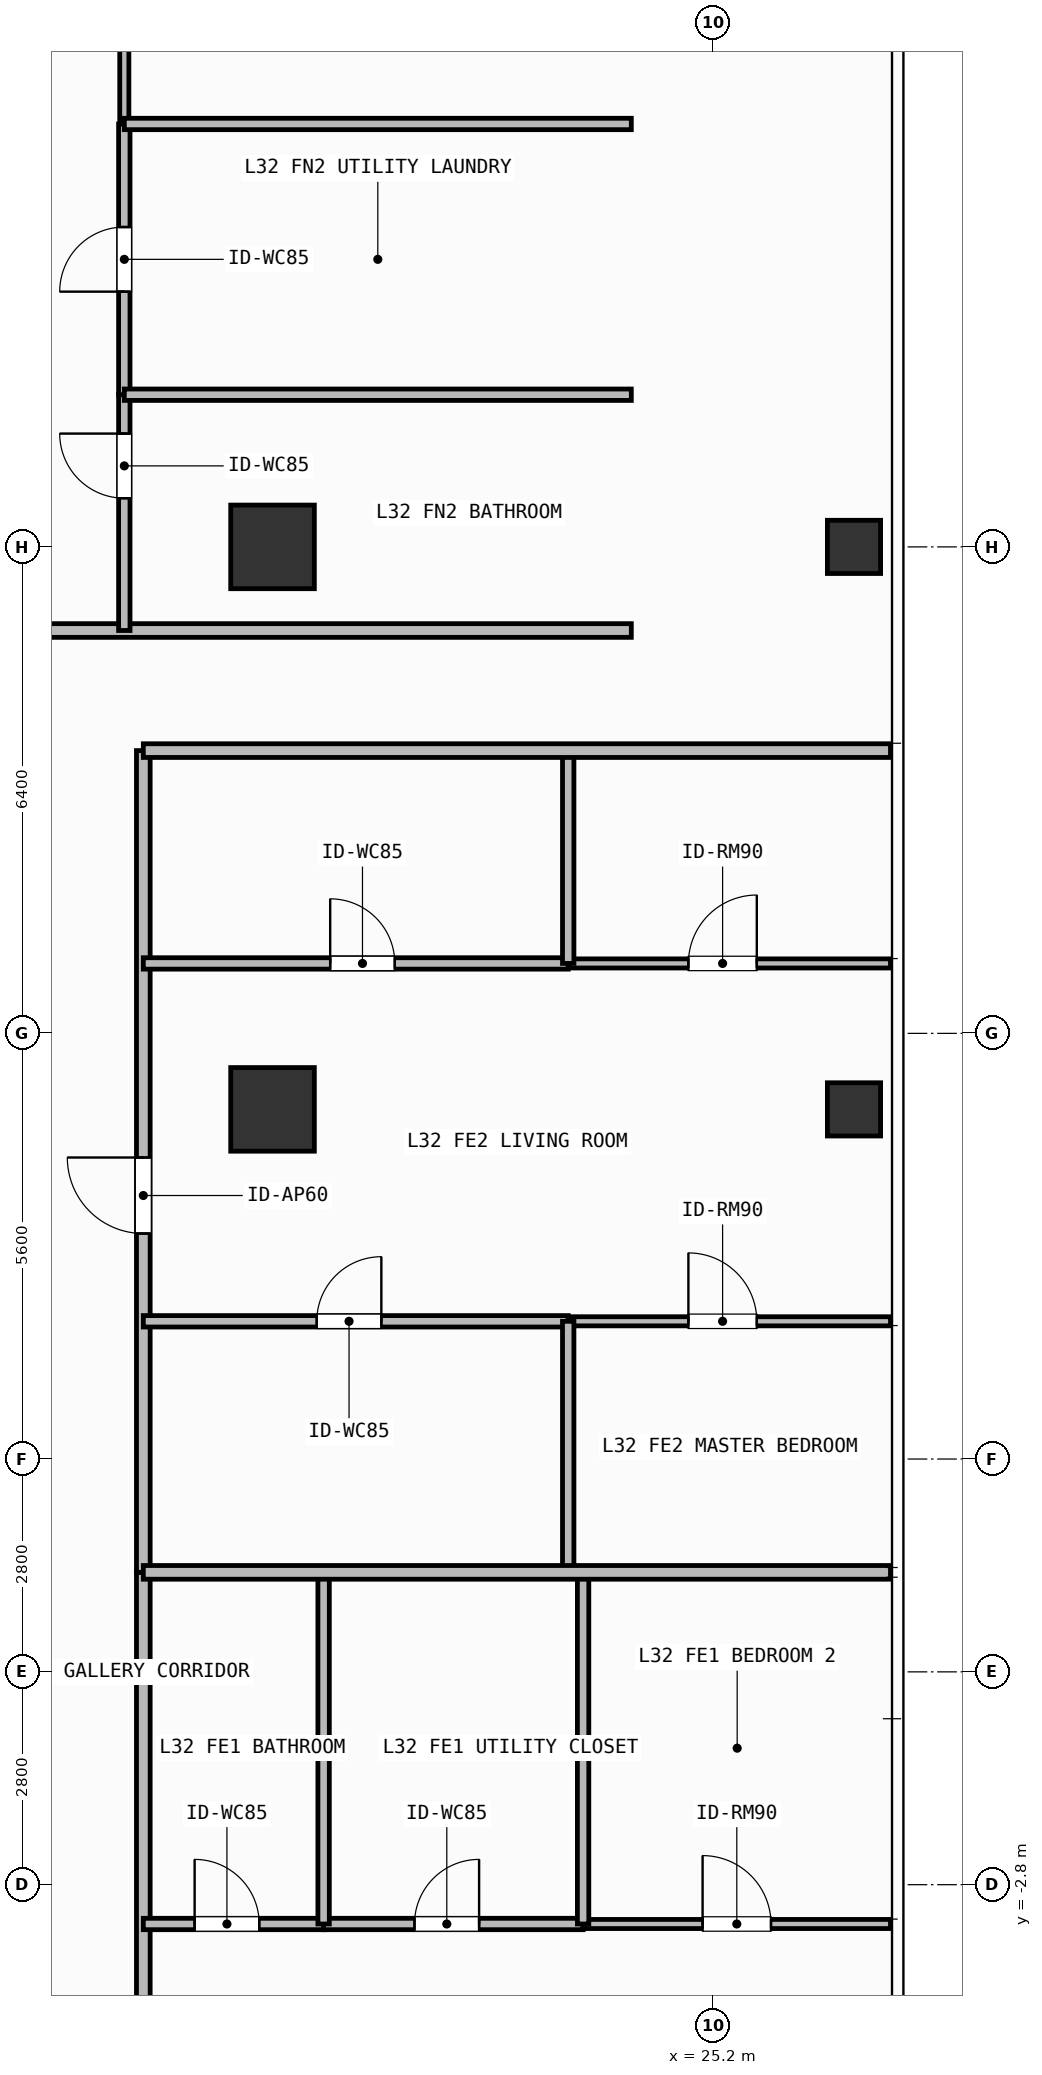
"""IFC4 building model, lengths in metres.
Left out: names, types, materials, properties, quantities, classifications, styles, units other than length and angle.
Written with IfcOpenShell. Run it as: python <this file> out.ifc"""

import sys

from ifc_helpers import new_model, si_unit, direction, frame, frame_2d, origin, origin_2d, place, context, subcontext, project, spatial, rectangle, hollow_rectangle, extrude, element, fill, save


model = new_model("IFC4")
c1 = context("Model", 3, precision=1e-05, world=origin(), true_north=direction((0.0, 1.0)))
c2 = subcontext(c1, "Body", "Model", "MODEL_VIEW")
j1 = project(units=[si_unit("LENGTHUNIT", "METRE"), si_unit("PLANEANGLEUNIT", "RADIAN")], contexts=[c1])
p1 = place(None, origin())
s1 = spatial("IfcSite", under=j1, at=p1, CompositionType="ELEMENT")
p2 = place(p1, origin())
s2 = spatial("IfcBuilding", under=s1, at=p2, CompositionType="ELEMENT")
p3 = place(p2, frame((0.0, 0.0, 129.0)))
s3 = spatial("IfcBuildingStorey", under=s2, at=p3, CompositionType="ELEMENT", Elevation=129.0)
for number, where, z_axis, x_axis in (
    (1, (19.4, 7.4, 0.0), (0.0, 0.0, 1.0), (1.0, 0.0, 0.0)),
    (2, (19.4, 14.8, 0.0), (0.0, 0.0, 1.0), (1.0, 0.0, 0.0)),
):
    element("IfcColumn", number, at=place(p3, frame(where, z_axis=z_axis, x_axis=x_axis)), inside=s3, PredefinedType="COLUMN", context=c2, shape_type="SweptSolid", body=[
        extrude(rectangle(XDim=1.1, YDim=1.1, at=origin_2d()), origin(), (0.0, 0.0, 1.0), 3.9),
    ])
for number, where, z_axis, x_axis in (
    (3, (27.05, 7.4, 0.0), (0.0, 0.0, 1.0), (1.0, 0.0, 0.0)),
    (4, (27.05, 14.8, 0.0), (0.0, 0.0, 1.0), (1.0, 0.0, 0.0)),
):
    element("IfcColumn", number, at=place(p3, frame(where, z_axis=z_axis, x_axis=x_axis)), inside=s3, PredefinedType="COLUMN", context=c2, shape_type="SweptSolid", body=[
        extrude(hollow_rectangle(XDim=0.7, YDim=0.7, WallThickness=0.032, at=origin_2d()), origin(), (0.0, 0.0, 1.0), 3.9),
    ])
p4 = place(p3, frame((1.474, 13.7, 0.0), z_axis=(0.0, 0.0, 1.0), x_axis=(1.0, 0.0, 0.0)))
e5 = element("IfcWall", 5, at=p4, inside=s3, PredefinedType="PARTITIONING", context=c2, shape_type="SweptSolid", body=[
    extrude(rectangle(XDim=22.646, YDim=0.18, at=frame_2d((11.323, 0.0))), origin(), (0.0, 0.0, 1.0), 3.68),
])
p5 = place(p4, frame((10.196, 0.0, 0.0)))
e6 = element("IfcOpeningElement", 6, at=p5, cuts=e5, PredefinedType="OPENING", context=c2, shape_type="SweptSolid", body=[
    extrude(rectangle(XDim=1.0, YDim=2.2, at=frame_2d((0.5, 1.1))), frame((0.0, 0.1, 0.0), z_axis=(0.0, -1.0, 0.0), x_axis=(1.0, 0.0, 0.0)), (0.0, 0.0, 1.0), 0.2),
])
p6 = place(p3, frame((17.45, 13.7, 0.0), z_axis=(0.0, 0.0, 1.0), x_axis=(0.0, 1.0, 0.0)))
e7 = element("IfcWall", 7, at=p6, inside=s3, PredefinedType="PARTITIONING", context=c2, shape_type="SweptSolid", body=[
    extrude(rectangle(XDim=3.102, YDim=0.15, at=frame_2d((1.551, 0.0))), origin(), (0.0, 0.0, 1.0), 3.68),
])
p7 = place(p6, frame((1.741, 0.0, 0.0)))
e8 = element("IfcOpeningElement", 8, at=p7, cuts=e7, PredefinedType="OPENING", context=c2, shape_type="SweptSolid", body=[
    extrude(rectangle(XDim=0.85, YDim=2.1, at=frame_2d((0.425, 1.05))), frame((0.0, 0.085, 0.0), z_axis=(0.0, -1.0, 0.0), x_axis=(1.0, 0.0, 0.0)), (0.0, 0.0, 1.0), 0.17),
])
p8 = place(p3, frame((17.45, 16.802, 0.0), z_axis=(0.0, 0.0, 1.0), x_axis=(0.0, 1.0, 0.0)))
e9 = element("IfcWall", 9, at=p8, inside=s3, PredefinedType="PARTITIONING", context=c2, shape_type="SweptSolid", body=[
    extrude(rectangle(XDim=3.562, YDim=0.15, at=frame_2d((1.781, 0.0))), origin(), (0.0, 0.0, 1.0), 3.68),
])
p9 = place(p8, frame((1.356, 0.0, 0.0)))
e10 = element("IfcOpeningElement", 10, at=p9, cuts=e9, PredefinedType="OPENING", context=c2, shape_type="SweptSolid", body=[
    extrude(rectangle(XDim=0.85, YDim=2.1, at=frame_2d((0.425, 1.05))), frame((0.0, 0.085, 0.0), z_axis=(0.0, -1.0, 0.0), x_axis=(1.0, 0.0, 0.0)), (0.0, 0.0, 1.0), 0.17),
])
p10 = place(p3, frame((17.45, 20.364, 0.0), z_axis=(0.0, 0.0, 1.0), x_axis=(0.0, 1.0, 0.0)))
e11 = element("IfcWall", 11, at=p10, inside=s3, PredefinedType="PARTITIONING", context=c2, shape_type="SweptSolid", body=[
    extrude(rectangle(XDim=4.826, YDim=0.12, at=frame_2d((2.413, 0.0))), origin(), (0.0, 0.0, 1.0), 3.68),
])
p11 = place(p10, frame((1.901, 0.0, 0.0)))
e12 = element("IfcOpeningElement", 12, at=p11, cuts=e11, PredefinedType="OPENING", context=c2, shape_type="SweptSolid", body=[
    extrude(rectangle(XDim=0.85, YDim=2.1, at=frame_2d((0.425, 1.05))), frame((0.0, 0.07, 0.0), z_axis=(0.0, -1.0, 0.0), x_axis=(1.0, 0.0, 0.0)), (0.0, 0.0, 1.0), 0.14),
])
p12 = place(p3, frame((17.7, -12.12, 0.0), z_axis=(0.0, 0.0, 1.0), x_axis=(0.0, 1.0, 0.0)))
e13 = element("IfcWall", 13, at=p12, inside=s3, PredefinedType="PARTITIONING", context=c2, shape_type="SweptSolid", body=[
    extrude(rectangle(XDim=13.429, YDim=0.18, at=frame_2d((6.715, 0.0))), origin(), (0.0, 0.0, 1.0), 3.68),
])
p13 = place(p12, frame((5.324, 0.0, 0.0)))
e14 = element("IfcOpeningElement", 14, at=p13, cuts=e13, PredefinedType="OPENING", context=c2, shape_type="SweptSolid", body=[
    extrude(rectangle(XDim=1.0, YDim=2.2, at=frame_2d((0.5, 1.1))), frame((0.0, 0.1, 0.0), z_axis=(0.0, -1.0, 0.0), x_axis=(1.0, 0.0, 0.0)), (0.0, 0.0, 1.0), 0.2),
])
p14 = place(p3, frame((17.7, -3.317, 0.0), z_axis=(0.0, 0.0, 1.0), x_axis=(1.0, 0.0, 0.0)))
e15 = element("IfcWall", 15, at=p14, inside=s3, PredefinedType="PARTITIONING", context=c2, shape_type="SweptSolid", body=[
    extrude(rectangle(XDim=2.372, YDim=0.15, at=frame_2d((1.186, 0.0))), origin(), (0.0, 0.0, 1.0), 3.68),
])
p15 = place(p14, frame((0.675, 0.0, 0.0)))
e16 = element("IfcOpeningElement", 16, at=p15, cuts=e15, PredefinedType="OPENING", context=c2, shape_type="SweptSolid", body=[
    extrude(rectangle(XDim=0.85, YDim=2.1, at=frame_2d((0.425, 1.05))), frame((0.0, 0.085, 0.0), z_axis=(0.0, -1.0, 0.0), x_axis=(1.0, 0.0, 0.0)), (0.0, 0.0, 1.0), 0.17),
])
p16 = place(p3, frame((20.072, -3.317, 0.0), z_axis=(0.0, 0.0, 1.0), x_axis=(1.0, 0.0, 0.0)))
e17 = element("IfcWall", 17, at=p16, inside=s3, PredefinedType="PARTITIONING", context=c2, shape_type="SweptSolid", body=[
    extrude(rectangle(XDim=3.414, YDim=0.15, at=frame_2d((1.707, 0.0))), origin(), (0.0, 0.0, 1.0), 3.68),
])
p17 = place(p16, frame((1.196, 0.0, 0.0)))
e18 = element("IfcOpeningElement", 18, at=p17, cuts=e17, PredefinedType="OPENING", context=c2, shape_type="SweptSolid", body=[
    extrude(rectangle(XDim=0.85, YDim=2.1, at=frame_2d((0.425, 1.05))), frame((0.0, 0.085, 0.0), z_axis=(0.0, -1.0, 0.0), x_axis=(1.0, 0.0, 0.0)), (0.0, 0.0, 1.0), 0.17),
])
p18 = place(p3, frame((23.486, -3.317, 0.0), z_axis=(0.0, 0.0, 1.0), x_axis=(1.0, 0.0, 0.0)))
e19 = element("IfcWall", 19, at=p18, inside=s3, PredefinedType="PARTITIONING", context=c2, shape_type="SweptSolid", body=[
    extrude(rectangle(XDim=4.044, YDim=0.12, at=frame_2d((2.022, 0.0))), origin(), (0.0, 0.0, 1.0), 3.68),
])
p19 = place(p18, frame((1.572, 0.0, 0.0)))
e20 = element("IfcOpeningElement", 20, at=p19, cuts=e19, PredefinedType="OPENING", context=c2, shape_type="SweptSolid", body=[
    extrude(rectangle(XDim=0.9, YDim=2.1, at=frame_2d((0.45, 1.05))), frame((0.0, 0.07, 0.0), z_axis=(0.0, -1.0, 0.0), x_axis=(1.0, 0.0, 0.0)), (0.0, 0.0, 1.0), 0.14),
])
p20 = place(p3, frame((17.7, 1.309, 0.0), z_axis=(0.0, 0.0, 1.0), x_axis=(0.0, 1.0, 0.0)))
e21 = element("IfcWall", 21, at=p20, inside=s3, PredefinedType="PARTITIONING", context=c2, shape_type="SweptSolid", body=[
    extrude(rectangle(XDim=10.811, YDim=0.18, at=frame_2d((5.406, 0.0))), origin(), (0.0, 0.0, 1.0), 3.68),
])
p21 = place(p20, frame((4.458, 0.0, 0.0)))
e22 = element("IfcOpeningElement", 22, at=p21, cuts=e21, PredefinedType="OPENING", context=c2, shape_type="SweptSolid", body=[
    extrude(rectangle(XDim=1.0, YDim=2.2, at=frame_2d((0.5, 1.1))), frame((0.0, 0.1, 0.0), z_axis=(0.0, -1.0, 0.0), x_axis=(1.0, 0.0, 0.0)), (0.0, 0.0, 1.0), 0.2),
])
p22 = place(p3, frame((17.7, 9.32, 0.0), z_axis=(0.0, 0.0, 1.0), x_axis=(1.0, 0.0, 0.0)))
e23 = element("IfcWall", 23, at=p22, inside=s3, PredefinedType="PARTITIONING", context=c2, shape_type="SweptSolid", body=[
    extrude(rectangle(XDim=5.59, YDim=0.15, at=frame_2d((2.795, 0.0))), origin(), (0.0, 0.0, 1.0), 3.68),
])
p23 = place(p22, frame((2.458, 0.0, 0.0)))
e24 = element("IfcOpeningElement", 24, at=p23, cuts=e23, PredefinedType="OPENING", context=c2, shape_type="SweptSolid", body=[
    extrude(rectangle(XDim=0.85, YDim=2.1, at=frame_2d((0.425, 1.05))), frame((0.0, 0.085, 0.0), z_axis=(0.0, -1.0, 0.0), x_axis=(1.0, 0.0, 0.0)), (0.0, 0.0, 1.0), 0.17),
])
p24 = place(p3, frame((17.7, 4.612, 0.0), z_axis=(0.0, 0.0, 1.0), x_axis=(1.0, 0.0, 0.0)))
e25 = element("IfcWall", 25, at=p24, inside=s3, PredefinedType="PARTITIONING", context=c2, shape_type="SweptSolid", body=[
    extrude(rectangle(XDim=5.59, YDim=0.15, at=frame_2d((2.795, 0.0))), origin(), (0.0, 0.0, 1.0), 3.68),
])
p25 = place(p24, frame((2.281, 0.0, 0.0)))
e26 = element("IfcOpeningElement", 26, at=p25, cuts=e25, PredefinedType="OPENING", context=c2, shape_type="SweptSolid", body=[
    extrude(rectangle(XDim=0.85, YDim=2.1, at=frame_2d((0.425, 1.05))), frame((0.0, 0.085, 0.0), z_axis=(0.0, -1.0, 0.0), x_axis=(1.0, 0.0, 0.0)), (0.0, 0.0, 1.0), 0.17),
])
p26 = place(p3, frame((23.29, 4.612, 0.0), z_axis=(0.0, 0.0, 1.0), x_axis=(1.0, 0.0, 0.0)))
e27 = element("IfcWall", 27, at=p26, inside=s3, PredefinedType="PARTITIONING", context=c2, shape_type="SweptSolid", body=[
    extrude(rectangle(XDim=4.24, YDim=0.12, at=frame_2d((2.12, 0.0))), origin(), (0.0, 0.0, 1.0), 3.68),
])
p27 = place(p26, frame((1.581, 0.0, 0.0)))
e28 = element("IfcOpeningElement", 28, at=p27, cuts=e27, PredefinedType="OPENING", context=c2, shape_type="SweptSolid", body=[
    extrude(rectangle(XDim=0.9, YDim=2.1, at=frame_2d((0.45, 1.05))), frame((0.0, 0.07, 0.0), z_axis=(0.0, -1.0, 0.0), x_axis=(1.0, 0.0, 0.0)), (0.0, 0.0, 1.0), 0.14),
])
p28 = place(p3, frame((23.29, 9.32, 0.0), z_axis=(0.0, 0.0, 1.0), x_axis=(1.0, 0.0, 0.0)))
e29 = element("IfcWall", 29, at=p28, inside=s3, PredefinedType="PARTITIONING", context=c2, shape_type="SweptSolid", body=[
    extrude(rectangle(XDim=4.24, YDim=0.12, at=frame_2d((2.12, 0.0))), origin(), (0.0, 0.0, 1.0), 3.68),
])
p29 = place(p28, frame((1.581, 0.0, 0.0)))
e30 = element("IfcOpeningElement", 30, at=p29, cuts=e29, PredefinedType="OPENING", context=c2, shape_type="SweptSolid", body=[
    extrude(rectangle(XDim=0.9, YDim=2.1, at=frame_2d((0.45, 1.05))), frame((0.0, 0.07, 0.0), z_axis=(0.0, -1.0, 0.0), x_axis=(1.0, 0.0, 0.0)), (0.0, 0.0, 1.0), 0.14),
])
for number, where, z_axis, x_axis in (
    (31, (17.45, 16.802, 0.0), (0.0, 0.0, 1.0), (1.0, 0.0, 0.0)),
    (32, (17.45, 20.364, 0.0), (0.0, 0.0, 1.0), (1.0, 0.0, 0.0)),
):
    element("IfcWall", number, at=place(p3, frame(where, z_axis=z_axis, x_axis=x_axis)), inside=s3, PredefinedType="PARTITIONING", context=c2, shape_type="SweptSolid", body=[
        extrude(rectangle(XDim=6.67, YDim=0.15, at=frame_2d((3.335, 0.0))), origin(), (0.0, 0.0, 1.0), 3.68),
    ])
for number, where, z_axis, x_axis in (
    (33, (20.072, -3.317, 0.0), (0.0, 0.0, 1.0), (0.0, 1.0, 0.0)),
    (34, (23.486, -3.317, 0.0), (0.0, 0.0, 1.0), (0.0, 1.0, 0.0)),
):
    element("IfcWall", number, at=place(p3, frame(where, z_axis=z_axis, x_axis=x_axis)), inside=s3, PredefinedType="PARTITIONING", context=c2, shape_type="SweptSolid", body=[
        extrude(rectangle(XDim=4.626, YDim=0.15, at=frame_2d((2.313, 0.0))), origin(), (0.0, 0.0, 1.0), 3.68),
    ])
p30 = place(p3, frame((23.29, 1.309, 0.0), z_axis=(0.0, 0.0, 1.0), x_axis=(0.0, 1.0, 0.0)))
e35 = element("IfcWall", 35, at=p30, inside=s3, PredefinedType="PARTITIONING", context=c2, shape_type="SweptSolid", body=[
    extrude(rectangle(XDim=3.303, YDim=0.15, at=frame_2d((1.651, 0.0))), origin(), (0.0, 0.0, 1.0), 3.68),
])
p31 = place(p3, frame((23.29, 9.32, 0.0), z_axis=(0.0, 0.0, 1.0), x_axis=(0.0, 1.0, 0.0)))
e36 = element("IfcWall", 36, at=p31, inside=s3, PredefinedType="PARTITIONING", context=c2, shape_type="SweptSolid", body=[
    extrude(rectangle(XDim=2.8, YDim=0.15, at=frame_2d((1.4, 0.0))), origin(), (0.0, 0.0, 1.0), 3.68),
])
for number, where, z_axis, x_axis in (
    (37, (17.7, 1.309, 0.0), (0.0, 0.0, 1.0), (1.0, 0.0, 0.0)),
    (38, (17.7, 12.12, 0.0), (0.0, 0.0, 1.0), (1.0, 0.0, 0.0)),
):
    element("IfcWall", number, at=place(p3, frame(where, z_axis=z_axis, x_axis=x_axis)), inside=s3, PredefinedType="PARTITIONING", context=c2, shape_type="SweptSolid", body=[
        extrude(rectangle(XDim=9.83, YDim=0.18, at=frame_2d((4.915, 0.0))), origin(), (0.0, 0.0, 1.0), 3.68),
    ])
p32 = place(p7, origin())
e39 = element("IfcDoor", 39, at=p32, inside=s3, OperationType="SINGLE_SWING_RIGHT", PredefinedType="DOOR", context=c2, shape_type="SweptSolid", body=[
    extrude(rectangle(XDim=0.85, YDim=2.1, at=frame_2d((0.425, 1.05))), frame((0.0, 0.025, 0.0), z_axis=(0.0, -1.0, 0.0), x_axis=(1.0, 0.0, 0.0)), (0.0, 0.0, 1.0), 0.05),
])
fill(e8, e39)
p33 = place(p9, origin())
e40 = element("IfcDoor", 40, at=p33, inside=s3, OperationType="SINGLE_SWING_LEFT", PredefinedType="DOOR", context=c2, shape_type="SweptSolid", body=[
    extrude(rectangle(XDim=0.85, YDim=2.1, at=frame_2d((0.425, 1.05))), frame((0.0, 0.025, 0.0), z_axis=(0.0, -1.0, 0.0), x_axis=(1.0, 0.0, 0.0)), (0.0, 0.0, 1.0), 0.05),
])
fill(e10, e40)
p34 = place(p15, origin())
e41 = element("IfcDoor", 41, at=p34, inside=s3, OperationType="SINGLE_SWING_LEFT", PredefinedType="DOOR", context=c2, shape_type="SweptSolid", body=[
    extrude(rectangle(XDim=0.85, YDim=2.1, at=frame_2d((0.425, 1.05))), frame((0.0, 0.025, 0.0), z_axis=(0.0, -1.0, 0.0), x_axis=(1.0, 0.0, 0.0)), (0.0, 0.0, 1.0), 0.05),
])
fill(e16, e41)
p35 = place(p17, origin())
e42 = element("IfcDoor", 42, at=p35, inside=s3, OperationType="SINGLE_SWING_RIGHT", PredefinedType="DOOR", context=c2, shape_type="SweptSolid", body=[
    extrude(rectangle(XDim=0.85, YDim=2.1, at=frame_2d((0.425, 1.05))), frame((0.0, 0.025, 0.0), z_axis=(0.0, -1.0, 0.0), x_axis=(1.0, 0.0, 0.0)), (0.0, 0.0, 1.0), 0.05),
])
fill(e18, e42)
p36 = place(p19, origin())
e43 = element("IfcDoor", 43, at=p36, inside=s3, OperationType="SINGLE_SWING_LEFT", PredefinedType="DOOR", context=c2, shape_type="SweptSolid", body=[
    extrude(rectangle(XDim=0.9, YDim=2.1, at=frame_2d((0.45, 1.05))), frame((0.0, 0.025, 0.0), z_axis=(0.0, -1.0, 0.0), x_axis=(1.0, 0.0, 0.0)), (0.0, 0.0, 1.0), 0.05),
])
fill(e20, e43)
p37 = place(p21, origin())
e44 = element("IfcDoor", 44, at=p37, inside=s3, OperationType="SINGLE_SWING_RIGHT", PredefinedType="DOOR", context=c2, shape_type="SweptSolid", body=[
    extrude(rectangle(XDim=1.0, YDim=2.2, at=frame_2d((0.5, 1.1))), frame((0.0, 0.025, 0.0), z_axis=(0.0, -1.0, 0.0), x_axis=(1.0, 0.0, 0.0)), (0.0, 0.0, 1.0), 0.05),
])
fill(e22, e44)
p38 = place(p23, origin())
e45 = element("IfcDoor", 45, at=p38, inside=s3, OperationType="SINGLE_SWING_LEFT", PredefinedType="DOOR", context=c2, shape_type="SweptSolid", body=[
    extrude(rectangle(XDim=0.85, YDim=2.1, at=frame_2d((0.425, 1.05))), frame((0.0, 0.025, 0.0), z_axis=(0.0, -1.0, 0.0), x_axis=(1.0, 0.0, 0.0)), (0.0, 0.0, 1.0), 0.05),
])
fill(e24, e45)
p39 = place(p25, origin())
e46 = element("IfcDoor", 46, at=p39, inside=s3, OperationType="SINGLE_SWING_RIGHT", PredefinedType="DOOR", context=c2, shape_type="SweptSolid", body=[
    extrude(rectangle(XDim=0.85, YDim=2.1, at=frame_2d((0.425, 1.05))), frame((0.0, 0.025, 0.0), z_axis=(0.0, -1.0, 0.0), x_axis=(1.0, 0.0, 0.0)), (0.0, 0.0, 1.0), 0.05),
])
fill(e26, e46)
p40 = place(p27, origin())
e47 = element("IfcDoor", 47, at=p40, inside=s3, OperationType="SINGLE_SWING_LEFT", PredefinedType="DOOR", context=c2, shape_type="SweptSolid", body=[
    extrude(rectangle(XDim=0.9, YDim=2.1, at=frame_2d((0.45, 1.05))), frame((0.0, 0.025, 0.0), z_axis=(0.0, -1.0, 0.0), x_axis=(1.0, 0.0, 0.0)), (0.0, 0.0, 1.0), 0.05),
])
fill(e28, e47)
p41 = place(p29, origin())
e48 = element("IfcDoor", 48, at=p41, inside=s3, OperationType="SINGLE_SWING_RIGHT", PredefinedType="DOOR", context=c2, shape_type="SweptSolid", body=[
    extrude(rectangle(XDim=0.9, YDim=2.1, at=frame_2d((0.45, 1.05))), frame((0.0, 0.025, 0.0), z_axis=(0.0, -1.0, 0.0), x_axis=(1.0, 0.0, 0.0)), (0.0, 0.0, 1.0), 0.05),
])
fill(e30, e48)
save(model, sys.argv[1])
